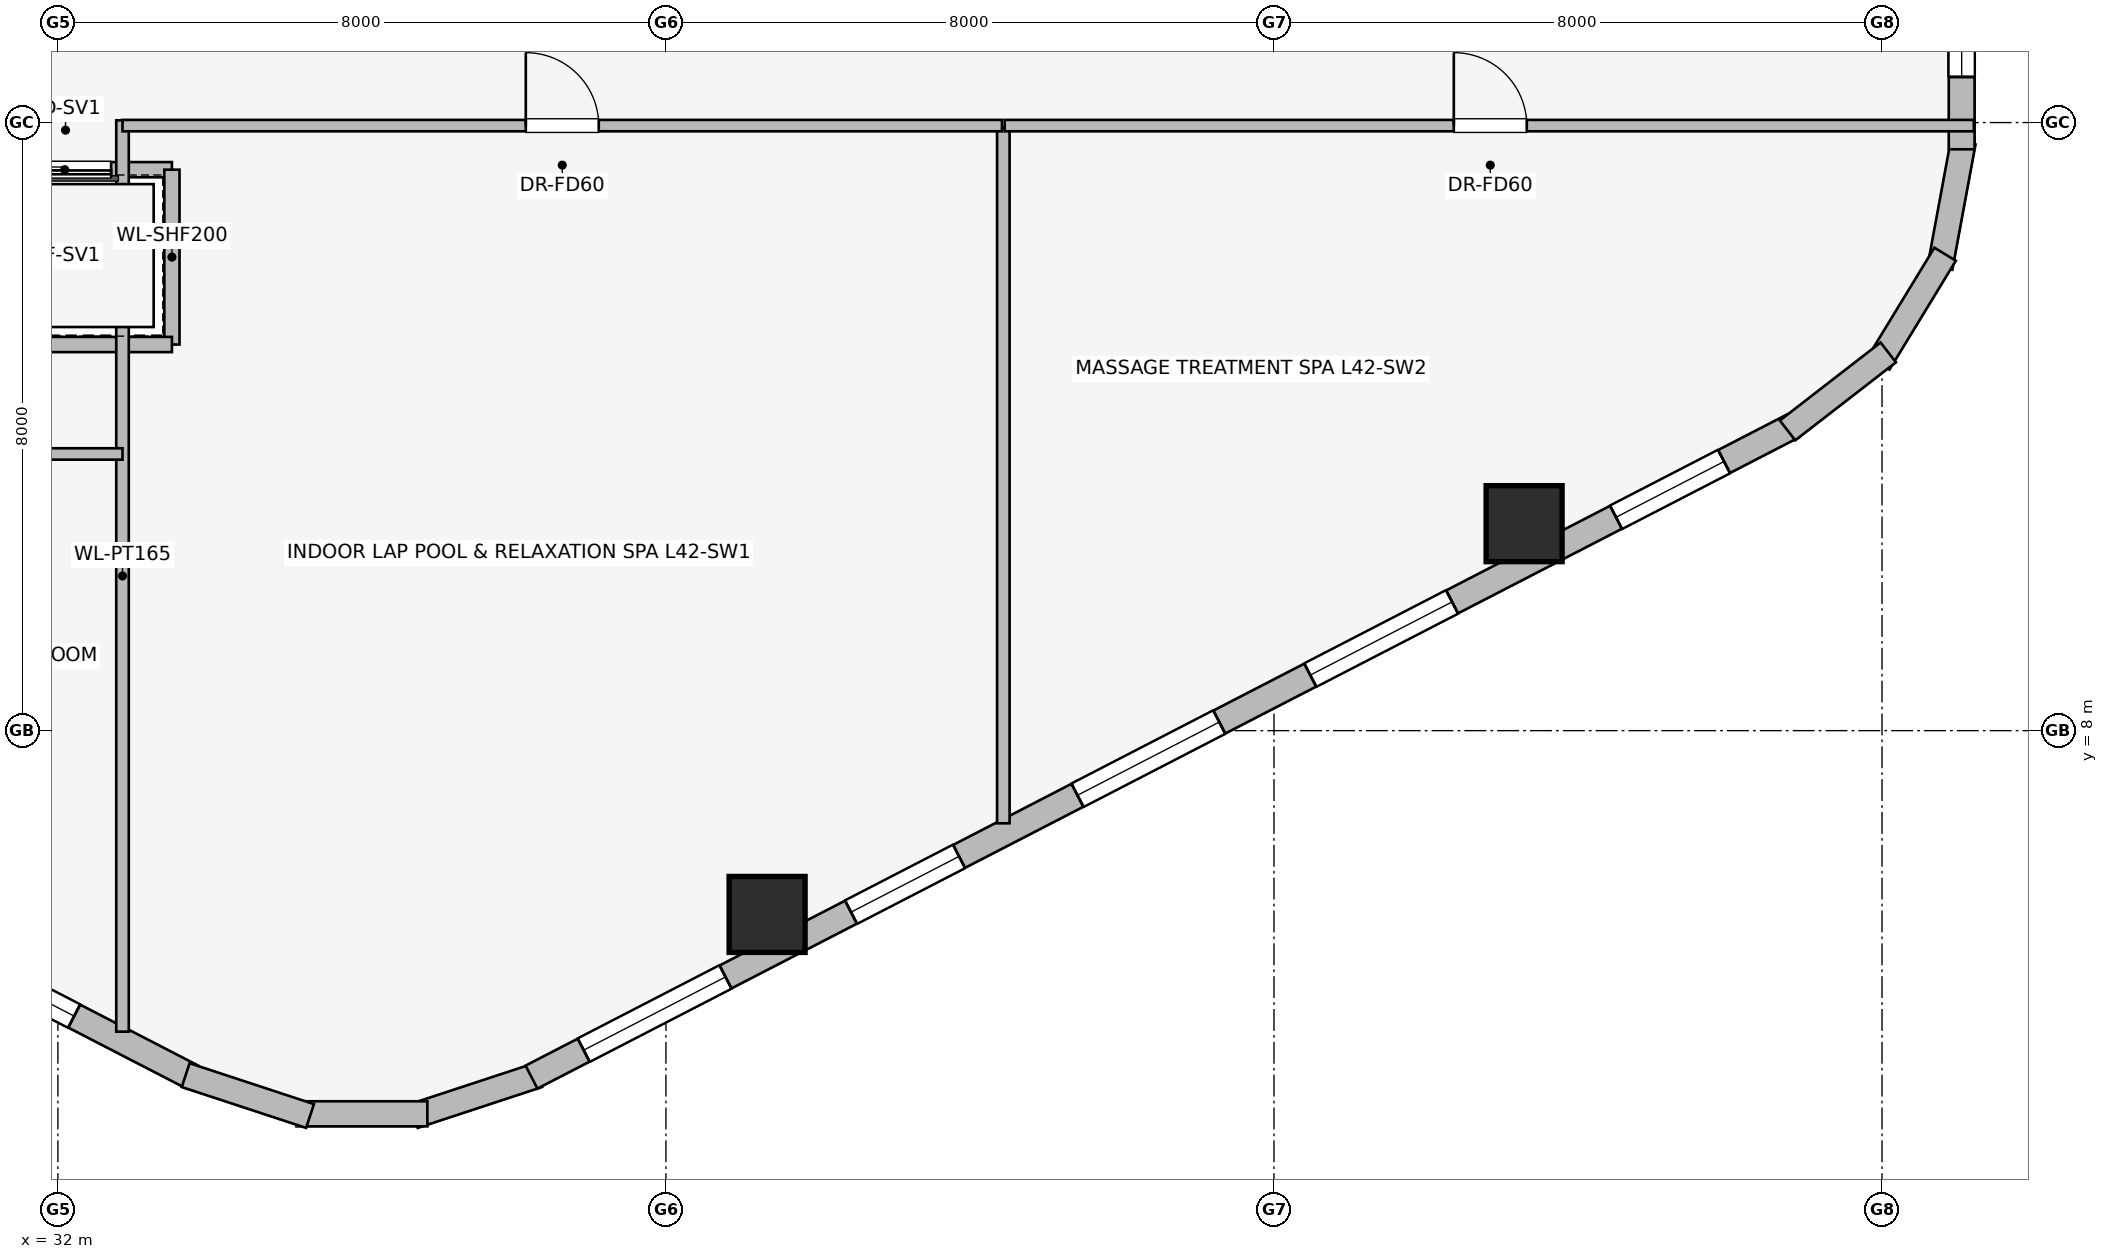
"""IFC4 building model, lengths in metres.
Left out: names, types, materials, properties, quantities, classifications, styles, units other than length and angle.
Written with IfcOpenShell. Run it as: python <this file> out.ifc"""

import sys

from ifc_helpers import new_model, si_unit, direction, frame, frame_2d, origin, origin_2d, place, context, subcontext, project, spatial, rectangle, extrude, element, fill, save


model = new_model("IFC4")
c1 = context("Model", 3, precision=1e-05, world=origin(), true_north=direction((0.0, 1.0)))
c2 = subcontext(c1, "Body", "Model", "MODEL_VIEW")
j1 = project(units=[si_unit("LENGTHUNIT", "METRE"), si_unit("PLANEANGLEUNIT", "RADIAN")], contexts=[c1])
p1 = place(None, origin())
s1 = spatial("IfcSite", under=j1, at=p1, CompositionType="ELEMENT")
p2 = place(p1, origin())
s2 = spatial("IfcBuilding", under=s1, at=p2, CompositionType="ELEMENT")
p3 = place(p2, frame((0.0, 0.0, 156.75)))
s3 = spatial("IfcBuildingStorey", under=s2, at=p3, CompositionType="ELEMENT", Elevation=156.75)
for number, where, z_axis, x_axis in (
    (1, (41.331, 5.582, 0.0), (0.0, 0.0, 1.0), (1.0, 0.0, 0.0)),
    (2, (51.291, 10.723, 0.0), (0.0, 0.0, 1.0), (1.0, 0.0, 0.0)),
):
    element("IfcColumn", number, at=place(p3, frame(where, z_axis=z_axis, x_axis=x_axis)), inside=s3, PredefinedType="COLUMN", context=c2, shape_type="SweptSolid", body=[
        extrude(rectangle(XDim=1.0, YDim=1.0, at=origin_2d()), origin(), (0.0, 0.0, 1.0), 3.45),
    ])
p4 = place(p3, frame((33.769, 3.442, 0.0), z_axis=(0.0, 0.0, 1.0), x_axis=(-0.888613612362, 0.458656568606, 0.0)))
e3 = element("IfcWall", 3, at=p4, inside=s3, PredefinedType="STANDARD", context=c2, shape_type="SweptSolid", body=[
    extrude(rectangle(XDim=18.681, YDim=0.34, at=frame_2d((9.34, 0.0))), origin(), (0.0, 0.0, 1.0), 2.562),
])
p5 = place(p4, frame((1.75, 0.0, 0.75)))
e4 = element("IfcOpeningElement", 4, at=p5, cuts=e3, PredefinedType="OPENING", context=c2, shape_type="SweptSolid", body=[
    extrude(rectangle(XDim=1.05, YDim=1.4, at=frame_2d((0.525, 0.7))), frame((0.0, 0.18, 0.0), z_axis=(0.0, -1.0, 0.0), x_axis=(1.0, 0.0, 0.0)), (0.0, 0.0, 1.0), 0.36),
])
p6 = place(p4, frame((7.007, 0.0, 0.75)))
e5 = element("IfcOpeningElement", 5, at=p6, cuts=e3, PredefinedType="OPENING", context=c2, shape_type="SweptSolid", body=[
    extrude(rectangle(XDim=2.1, YDim=1.5, at=frame_2d((1.05, 0.75))), frame((0.0, 0.18, 0.0), z_axis=(0.0, -1.0, 0.0), x_axis=(1.0, 0.0, 0.0)), (0.0, 0.0, 1.0), 0.36),
])
p7 = place(p4, frame((11.774, 0.0, 0.75)))
e6 = element("IfcOpeningElement", 6, at=p7, cuts=e3, PredefinedType="OPENING", context=c2, shape_type="SweptSolid", body=[
    extrude(rectangle(XDim=1.6, YDim=1.55, at=frame_2d((0.8, 0.775))), frame((0.0, 0.18, 0.0), z_axis=(0.0, -1.0, 0.0), x_axis=(1.0, 0.0, 0.0)), (0.0, 0.0, 1.0), 0.36),
])
p8 = place(p4, frame((15.92, 0.0, 0.75)))
e7 = element("IfcOpeningElement", 7, at=p8, cuts=e3, PredefinedType="OPENING", context=c2, shape_type="SweptSolid", body=[
    extrude(rectangle(XDim=1.05, YDim=1.4, at=frame_2d((0.525, 0.7))), frame((0.0, 0.18, 0.0), z_axis=(0.0, -1.0, 0.0), x_axis=(1.0, 0.0, 0.0)), (0.0, 0.0, 1.0), 0.36),
])
for number, where, z_axis, x_axis in (
    (8, (38.319, 3.468, 0.0), (0.0, 0.0, 1.0), (-0.95, -0.312, 0.0)),
    (9, (36.861, 2.959, 0.0), (0.0, 0.0, 1.0), (-1.0, 0.0, 0.0)),
    (10, (35.317, 2.93, 0.0), (0.0, 0.0, 1.0), (-0.95, 0.312, 0.0)),
):
    element("IfcWall", number, at=place(p3, frame(where, z_axis=z_axis, x_axis=x_axis)), inside=s3, PredefinedType="STANDARD", context=c2, shape_type="SweptSolid", body=[
        extrude(rectangle(XDim=1.722, YDim=0.33, at=frame_2d((0.861, 0.0))), origin(), (0.0, 0.0, 1.0), 3.19),
    ])
p9 = place(p3, frame((54.831, 12.01, 0.0), z_axis=(0.0, 0.0, 1.0), x_axis=(-0.888613612362, -0.458656568606, 0.0)))
e11 = element("IfcWall", 11, at=p9, inside=s3, PredefinedType="STANDARD", context=c2, shape_type="SweptSolid", body=[
    extrude(rectangle(XDim=18.681, YDim=0.34, at=frame_2d((9.34, 0.0))), origin(), (0.0, 0.0, 1.0), 3.19),
])
p10 = place(p9, frame((1.023, 0.0, 0.75)))
e12 = element("IfcOpeningElement", 12, at=p10, cuts=e11, PredefinedType="OPENING", context=c2, shape_type="SweptSolid", body=[
    extrude(rectangle(XDim=1.6, YDim=1.55, at=frame_2d((0.8, 0.775))), frame((0.0, 0.18, 0.0), z_axis=(0.0, -1.0, 0.0), x_axis=(1.0, 0.0, 0.0)), (0.0, 0.0, 1.0), 0.36),
])
p11 = place(p9, frame((5.05, 0.0, 0.75)))
e13 = element("IfcOpeningElement", 13, at=p11, cuts=e11, PredefinedType="OPENING", context=c2, shape_type="SweptSolid", body=[
    extrude(rectangle(XDim=2.1, YDim=1.5, at=frame_2d((1.05, 0.75))), frame((0.0, 0.18, 0.0), z_axis=(0.0, -1.0, 0.0), x_axis=(1.0, 0.0, 0.0)), (0.0, 0.0, 1.0), 0.36),
])
p12 = place(p9, frame((8.497, 0.0, 0.75)))
e14 = element("IfcOpeningElement", 14, at=p12, cuts=e11, PredefinedType="OPENING", context=c2, shape_type="SweptSolid", body=[
    extrude(rectangle(XDim=2.1, YDim=1.5, at=frame_2d((1.05, 0.75))), frame((0.0, 0.18, 0.0), z_axis=(0.0, -1.0, 0.0), x_axis=(1.0, 0.0, 0.0)), (0.0, 0.0, 1.0), 0.36),
])
p13 = place(p9, frame((12.35, 0.0, 0.75)))
e15 = element("IfcOpeningElement", 15, at=p13, cuts=e11, PredefinedType="OPENING", context=c2, shape_type="SweptSolid", body=[
    extrude(rectangle(XDim=1.6, YDim=1.55, at=frame_2d((0.8, 0.775))), frame((0.0, 0.18, 0.0), z_axis=(0.0, -1.0, 0.0), x_axis=(1.0, 0.0, 0.0)), (0.0, 0.0, 1.0), 0.36),
])
p14 = place(p9, frame((15.808, 0.0, 0.75)))
e16 = element("IfcOpeningElement", 16, at=p14, cuts=e11, PredefinedType="OPENING", context=c2, shape_type="SweptSolid", body=[
    extrude(rectangle(XDim=2.1, YDim=1.5, at=frame_2d((1.05, 0.75))), frame((0.0, 0.18, 0.0), z_axis=(0.0, -1.0, 0.0), x_axis=(1.0, 0.0, 0.0)), (0.0, 0.0, 1.0), 0.36),
])
p15 = place(p3, frame((57.068, 15.742, 0.0), z_axis=(0.0, 0.0, 1.0), x_axis=(-0.181984991895, -0.983301308209, 0.0)))
e17 = element("IfcWall", 17, at=p15, inside=s3, PredefinedType="STANDARD", context=c2, shape_type="SweptSolid", body=[
    extrude(rectangle(XDim=1.677, YDim=0.33, at=frame_2d((0.838, 0.0))), origin(), (0.0, 0.0, 1.0), 3.19),
])
p16 = place(p3, frame((56.83, 14.268, 0.0), z_axis=(0.0, 0.0, 1.0), x_axis=(-0.520519429557, -0.853849824883, 0.0)))
e18 = element("IfcWall", 18, at=p16, inside=s3, PredefinedType="STANDARD", context=c2, shape_type="SweptSolid", body=[
    extrude(rectangle(XDim=1.677, YDim=0.33, at=frame_2d((0.839, 0.0))), origin(), (0.0, 0.0, 1.0), 3.19),
])
p17 = place(p3, frame((56.082, 12.976, 0.0), z_axis=(0.0, 0.0, 1.0), x_axis=(-0.790621329885, -0.612305408053, 0.0)))
e19 = element("IfcWall", 19, at=p17, inside=s3, PredefinedType="STANDARD", context=c2, shape_type="SweptSolid", body=[
    extrude(rectangle(XDim=1.676, YDim=0.33, at=frame_2d((0.838, 0.0))), origin(), (0.0, 0.0, 1.0), 3.19),
])
p18 = place(p3, frame((57.048, 32.352, 0.0), z_axis=(0.0, 0.0, 1.0), x_axis=(0.0, -1.0, 0.0)))
e20 = element("IfcWall", 20, at=p18, inside=s3, PredefinedType="STANDARD", context=c2, shape_type="SweptSolid", body=[
    extrude(rectangle(XDim=16.704, YDim=0.34, at=frame_2d((8.352, 0.0))), origin(), (0.0, 0.0, 1.0), 3.19),
])
p19 = place(p18, frame((0.992, 0.0, 0.75)))
e21 = element("IfcOpeningElement", 21, at=p19, cuts=e20, PredefinedType="OPENING", context=c2, shape_type="SweptSolid", body=[
    extrude(rectangle(XDim=1.05, YDim=1.4, at=frame_2d((0.525, 0.7))), frame((0.0, 0.18, 0.0), z_axis=(0.0, -1.0, 0.0), x_axis=(1.0, 0.0, 0.0)), (0.0, 0.0, 1.0), 0.36),
])
p20 = place(p18, frame((4.935, 0.0, 0.75)))
e22 = element("IfcOpeningElement", 22, at=p20, cuts=e20, PredefinedType="OPENING", context=c2, shape_type="SweptSolid", body=[
    extrude(rectangle(XDim=2.1, YDim=1.5, at=frame_2d((1.05, 0.75))), frame((0.0, 0.18, 0.0), z_axis=(0.0, -1.0, 0.0), x_axis=(1.0, 0.0, 0.0)), (0.0, 0.0, 1.0), 0.36),
])
p21 = place(p18, frame((9.919, 0.0, 0.75)))
e23 = element("IfcOpeningElement", 23, at=p21, cuts=e20, PredefinedType="OPENING", context=c2, shape_type="SweptSolid", body=[
    extrude(rectangle(XDim=1.6, YDim=1.55, at=frame_2d((0.8, 0.775))), frame((0.0, 0.18, 0.0), z_axis=(0.0, -1.0, 0.0), x_axis=(1.0, 0.0, 0.0)), (0.0, 0.0, 1.0), 0.36),
])
p22 = place(p18, frame((14.702, 0.0, 0.75)))
e24 = element("IfcOpeningElement", 24, at=p22, cuts=e20, PredefinedType="OPENING", context=c2, shape_type="SweptSolid", body=[
    extrude(rectangle(XDim=1.05, YDim=1.4, at=frame_2d((0.525, 0.7))), frame((0.0, 0.18, 0.0), z_axis=(0.0, -1.0, 0.0), x_axis=(1.0, 0.0, 0.0)), (0.0, 0.0, 1.0), 0.36),
])
p23 = place(p3, frame((33.5, 15.38, 0.0), z_axis=(0.0, 0.0, 1.0), x_axis=(-1.0, 0.0, 0.0)))
e25 = element("IfcWall", 25, at=p23, inside=s3, PredefinedType="PARTITIONING", context=c2, shape_type="SweptSolid", body=[
    extrude(rectangle(XDim=2.82, YDim=0.2, at=frame_2d((1.41, 0.0))), origin(), (0.0, 0.0, 1.0), 3.19),
])
p24 = place(p23, frame((0.8, 0.0, 0.0)))
e26 = element("IfcOpeningElement", 26, at=p24, cuts=e25, PredefinedType="OPENING", context=c2, shape_type="SweptSolid", body=[
    extrude(rectangle(XDim=1.2, YDim=2.2, at=frame_2d((0.6, 1.1))), frame((0.0, 0.11, 0.0), z_axis=(0.0, -1.0, 0.0), x_axis=(1.0, 0.0, 0.0)), (0.0, 0.0, 1.0), 0.22),
])
p25 = place(p3, frame((33.5, 13.08, 0.0), z_axis=(0.0, 0.0, 1.0), x_axis=(0.0, 1.0, 0.0)))
e27 = element("IfcWall", 27, at=p25, inside=s3, PredefinedType="PARTITIONING", context=c2, shape_type="SweptSolid", body=[
    extrude(rectangle(XDim=2.3, YDim=0.2, at=frame_2d((1.15, 0.0))), origin(), (0.0, 0.0, 1.0), 3.19),
])
p26 = place(p3, frame((30.879, 13.08, 0.0), z_axis=(0.0, 0.0, 1.0), x_axis=(1.0, 0.0, 0.0)))
e28 = element("IfcWall", 28, at=p26, inside=s3, PredefinedType="PARTITIONING", context=c2, shape_type="SweptSolid", body=[
    extrude(rectangle(XDim=2.621, YDim=0.2, at=frame_2d((1.311, 0.0))), origin(), (0.0, 0.0, 1.0), 3.19),
])
p27 = place(p3, frame((32.85, 4.04, 0.0), z_axis=(0.0, 0.0, 1.0), x_axis=(0.0, 1.0, 0.0)))
e29 = element("IfcWall", 29, at=p27, inside=s3, PredefinedType="PARTITIONING", context=c2, shape_type="SweptSolid", body=[
    extrude(rectangle(XDim=11.99, YDim=0.165, at=frame_2d((5.995, 0.0))), origin(), (0.0, 0.0, 1.0), 3.19),
])
p28 = place(p3, frame((18.126, 11.64, 0.0), z_axis=(0.0, 0.0, 1.0), x_axis=(1.0, 0.0, 0.0)))
e30 = element("IfcWall", 30, at=p28, inside=s3, PredefinedType="PARTITIONING", context=c2, shape_type="SweptSolid", body=[
    extrude(rectangle(XDim=14.724, YDim=0.15, at=frame_2d((7.362, 0.0))), origin(), (0.0, 0.0, 1.0), 3.19),
])
p29 = place(p28, frame((4.274, 0.0, 0.0)))
e31 = element("IfcOpeningElement", 31, at=p29, cuts=e30, PredefinedType="OPENING", context=c2, shape_type="SweptSolid", body=[
    extrude(rectangle(XDim=0.9, YDim=2.0, at=frame_2d((0.45, 1.0))), frame((0.0, 0.085, 0.0), z_axis=(0.0, -1.0, 0.0), x_axis=(1.0, 0.0, 0.0)), (0.0, 0.0, 1.0), 0.17),
])
p30 = place(p28, frame((7.724, 0.0, 0.0)))
e32 = element("IfcOpeningElement", 32, at=p30, cuts=e30, PredefinedType="OPENING", context=c2, shape_type="SweptSolid", body=[
    extrude(rectangle(XDim=0.9, YDim=2.0, at=frame_2d((0.45, 1.0))), frame((0.0, 0.085, 0.0), z_axis=(0.0, -1.0, 0.0), x_axis=(1.0, 0.0, 0.0)), (0.0, 0.0, 1.0), 0.17),
])
p31 = place(p3, frame((44.439, 6.781, 0.0), z_axis=(0.0, 0.0, 1.0), x_axis=(0.0, 1.0, 0.0)))
e33 = element("IfcWall", 33, at=p31, inside=s3, PredefinedType="PARTITIONING", context=c2, shape_type="SweptSolid", body=[
    extrude(rectangle(XDim=9.149, YDim=0.165, at=frame_2d((4.574, 0.0))), origin(), (0.0, 0.0, 1.0), 3.19),
])
p32 = place(p3, frame((32.85, 15.96, 0.0), z_axis=(0.0, 0.0, 1.0), x_axis=(1.0, 0.0, 0.0)))
e34 = element("IfcWall", 34, at=p32, inside=s3, PredefinedType="PARTITIONING", context=c2, shape_type="SweptSolid", body=[
    extrude(rectangle(XDim=11.571, YDim=0.15, at=frame_2d((5.785, 0.0))), origin(), (0.0, 0.0, 1.0), 3.19),
])
p33 = place(p32, frame((5.306, 0.0, 0.0)))
e35 = element("IfcOpeningElement", 35, at=p33, cuts=e34, PredefinedType="OPENING", context=c2, shape_type="SweptSolid", body=[
    extrude(rectangle(XDim=0.96, YDim=2.0, at=frame_2d((0.48, 1.0))), frame((0.0, 0.085, 0.0), z_axis=(0.0, -1.0, 0.0), x_axis=(1.0, 0.0, 0.0)), (0.0, 0.0, 1.0), 0.17),
])
p34 = place(p3, frame((44.457, 15.96, 0.0), z_axis=(0.0, 0.0, 1.0), x_axis=(1.0, 0.0, 0.0)))
e36 = element("IfcWall", 36, at=p34, inside=s3, PredefinedType="PARTITIONING", context=c2, shape_type="SweptSolid", body=[
    extrude(rectangle(XDim=12.751, YDim=0.15, at=frame_2d((6.375, 0.0))), origin(), (0.0, 0.0, 1.0), 3.19),
])
p35 = place(p34, frame((5.909, 0.0, 0.0)))
e37 = element("IfcOpeningElement", 37, at=p35, cuts=e36, PredefinedType="OPENING", context=c2, shape_type="SweptSolid", body=[
    extrude(rectangle(XDim=0.96, YDim=2.0, at=frame_2d((0.48, 1.0))), frame((0.0, 0.085, 0.0), z_axis=(0.0, -1.0, 0.0), x_axis=(1.0, 0.0, 0.0)), (0.0, 0.0, 1.0), 0.17),
])
p36 = place(p5, origin())
e38 = element("IfcWindow", 38, at=p36, inside=s3, PartitioningType="SINGLE_PANEL", PredefinedType="WINDOW", context=c2, shape_type="SweptSolid", body=[
    extrude(rectangle(XDim=1.05, YDim=1.4, at=frame_2d((0.525, 0.7))), frame((0.0, 0.03, 0.0), z_axis=(0.0, -1.0, 0.0), x_axis=(1.0, 0.0, 0.0)), (0.0, 0.0, 1.0), 0.06),
])
fill(e4, e38)
p37 = place(p10, origin())
e39 = element("IfcWindow", 39, at=p37, inside=s3, PartitioningType="SINGLE_PANEL", PredefinedType="WINDOW", context=c2, shape_type="SweptSolid", body=[
    extrude(rectangle(XDim=1.6, YDim=1.55, at=frame_2d((0.8, 0.775))), frame((0.0, 0.03, 0.0), z_axis=(0.0, -1.0, 0.0), x_axis=(1.0, 0.0, 0.0)), (0.0, 0.0, 1.0), 0.06),
])
fill(e12, e39)
p38 = place(p11, origin())
e40 = element("IfcWindow", 40, at=p38, inside=s3, PartitioningType="SINGLE_PANEL", PredefinedType="WINDOW", context=c2, shape_type="SweptSolid", body=[
    extrude(rectangle(XDim=2.1, YDim=1.5, at=frame_2d((1.05, 0.75))), frame((0.0, 0.03, 0.0), z_axis=(0.0, -1.0, 0.0), x_axis=(1.0, 0.0, 0.0)), (0.0, 0.0, 1.0), 0.06),
])
fill(e13, e40)
p39 = place(p12, origin())
e41 = element("IfcWindow", 41, at=p39, inside=s3, PartitioningType="SINGLE_PANEL", PredefinedType="WINDOW", context=c2, shape_type="SweptSolid", body=[
    extrude(rectangle(XDim=2.1, YDim=1.5, at=frame_2d((1.05, 0.75))), frame((0.0, 0.03, 0.0), z_axis=(0.0, -1.0, 0.0), x_axis=(1.0, 0.0, 0.0)), (0.0, 0.0, 1.0), 0.06),
])
fill(e14, e41)
p40 = place(p13, origin())
e42 = element("IfcWindow", 42, at=p40, inside=s3, PartitioningType="SINGLE_PANEL", PredefinedType="WINDOW", context=c2, shape_type="SweptSolid", body=[
    extrude(rectangle(XDim=1.6, YDim=1.55, at=frame_2d((0.8, 0.775))), frame((0.0, 0.03, 0.0), z_axis=(0.0, -1.0, 0.0), x_axis=(1.0, 0.0, 0.0)), (0.0, 0.0, 1.0), 0.06),
])
fill(e15, e42)
p41 = place(p14, origin())
e43 = element("IfcWindow", 43, at=p41, inside=s3, PartitioningType="SINGLE_PANEL", PredefinedType="WINDOW", context=c2, shape_type="SweptSolid", body=[
    extrude(rectangle(XDim=2.1, YDim=1.5, at=frame_2d((1.05, 0.75))), frame((0.0, 0.03, 0.0), z_axis=(0.0, -1.0, 0.0), x_axis=(1.0, 0.0, 0.0)), (0.0, 0.0, 1.0), 0.06),
])
fill(e16, e43)
p42 = place(p22, origin())
e44 = element("IfcWindow", 44, at=p42, inside=s3, PartitioningType="SINGLE_PANEL", PredefinedType="WINDOW", context=c2, shape_type="SweptSolid", body=[
    extrude(rectangle(XDim=1.05, YDim=1.4, at=frame_2d((0.525, 0.7))), frame((0.0, 0.03, 0.0), z_axis=(0.0, -1.0, 0.0), x_axis=(1.0, 0.0, 0.0)), (0.0, 0.0, 1.0), 0.06),
])
fill(e24, e44)
p43 = place(p24, origin())
e45 = element("IfcDoor", 45, at=p43, inside=s3, OperationType="SLIDING_TO_RIGHT", PredefinedType="DOOR", context=c2, shape_type="SweptSolid", body=[
    extrude(rectangle(XDim=1.2, YDim=2.2, at=frame_2d((0.6, 1.1))), frame((0.0, 0.025, 0.0), z_axis=(0.0, -1.0, 0.0), x_axis=(1.0, 0.0, 0.0)), (0.0, 0.0, 1.0), 0.05),
])
fill(e26, e45)
p44 = place(p33, origin())
e46 = element("IfcDoor", 46, at=p44, inside=s3, OperationType="SINGLE_SWING_LEFT", PredefinedType="DOOR", context=c2, shape_type="SweptSolid", body=[
    extrude(rectangle(XDim=0.96, YDim=2.0, at=frame_2d((0.48, 1.0))), frame((0.0, 0.025, 0.0), z_axis=(0.0, -1.0, 0.0), x_axis=(1.0, 0.0, 0.0)), (0.0, 0.0, 1.0), 0.05),
])
fill(e35, e46)
p45 = place(p35, origin())
e47 = element("IfcDoor", 47, at=p45, inside=s3, OperationType="SINGLE_SWING_LEFT", PredefinedType="DOOR", context=c2, shape_type="SweptSolid", body=[
    extrude(rectangle(XDim=0.96, YDim=2.0, at=frame_2d((0.48, 1.0))), frame((0.0, 0.025, 0.0), z_axis=(0.0, -1.0, 0.0), x_axis=(1.0, 0.0, 0.0)), (0.0, 0.0, 1.0), 0.05),
])
fill(e37, e47)
save(model, sys.argv[1])
